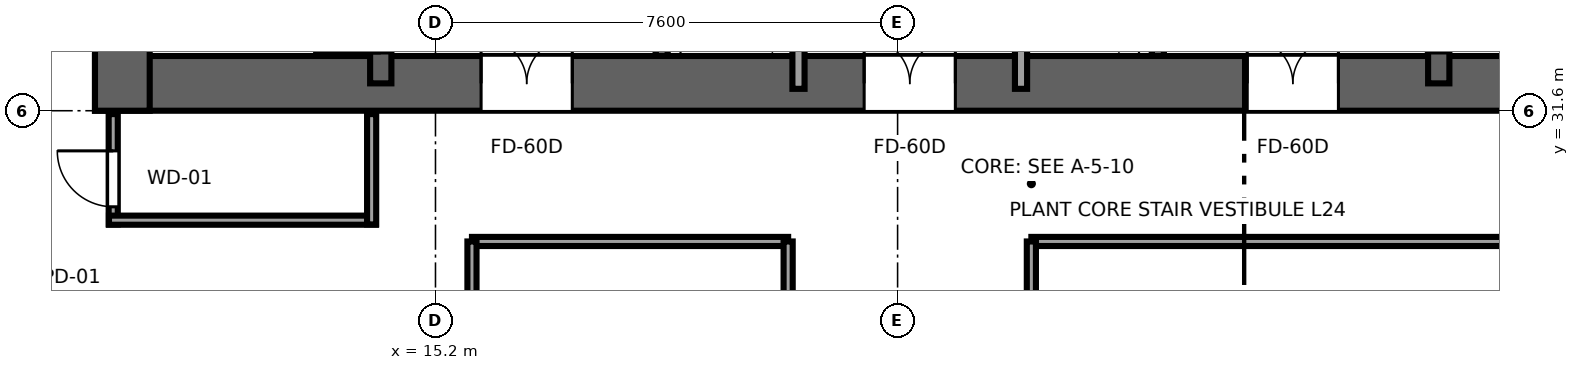
"""IFC4 building model, lengths in metres.
Left out: names, types, materials, properties, quantities, classifications, styles, units other than length and angle.
Written with IfcOpenShell. Run it as: python <this file> out.ifc"""

import sys

from ifc_helpers import new_model, si_unit, direction, frame, frame_2d, origin, place, context, subcontext, project, spatial, rectangle, extrude, source, transform, mapped, element, fill, save


model = new_model("IFC4")
c1 = context("Model", 3, precision=1e-05, world=origin(), true_north=direction((0.0, 1.0)))
c2 = subcontext(c1, "Body", "Model", "MODEL_VIEW")
j1 = project(units=[si_unit("LENGTHUNIT", "METRE"), si_unit("PLANEANGLEUNIT", "RADIAN")], contexts=[c1])
p1 = place(None, origin())
s1 = spatial("IfcSite", under=j1, at=p1, CompositionType="ELEMENT")
p2 = place(p1, origin())
s2 = spatial("IfcBuilding", under=s1, at=p2, CompositionType="ELEMENT")
p3 = place(p2, frame((0.0, 0.0, 95.9)))
s3 = spatial("IfcBuildingStorey", under=s2, at=p3, CompositionType="ELEMENT", Elevation=95.9)
p4 = place(p3, frame((9.6, 32.05, 0.0), z_axis=(0.0, 0.0, 1.0), x_axis=(1.0, 0.0, 0.0)))
e1 = element("IfcWall", 1, at=p4, inside=s3, PredefinedType="SHEAR", context=c2, shape_type="SweptSolid", body=[
    extrude(rectangle(XDim=26.8, YDim=0.9, at=frame_2d((13.4, 0.0))), origin(), (0.0, 0.0, 1.0), 5.0),
])
p5 = place(p4, frame((7.85, 0.0, 0.0), z_axis=(0.0, 0.0, 1.0), x_axis=(-1.0, 0.0, 0.0)))
e2 = element("IfcOpeningElement", 2, at=p5, cuts=e1, PredefinedType="OPENING", context=c2, shape_type="SweptSolid", body=[
    extrude(rectangle(XDim=1.5, YDim=2.04, at=frame_2d((0.75, 1.02))), frame((0.0, 0.46, 0.0), z_axis=(0.0, -1.0, 0.0), x_axis=(1.0, 0.0, 0.0)), (0.0, 0.0, 1.0), 0.92),
])
p6 = place(p4, frame((14.15, 0.0, 0.0), z_axis=(0.0, 0.0, 1.0), x_axis=(-1.0, 0.0, 0.0)))
e3 = element("IfcOpeningElement", 3, at=p6, cuts=e1, PredefinedType="OPENING", context=c2, shape_type="SweptSolid", body=[
    extrude(rectangle(XDim=1.5, YDim=2.04, at=frame_2d((0.75, 1.02))), frame((0.0, 0.46, 0.0), z_axis=(0.0, -1.0, 0.0), x_axis=(1.0, 0.0, 0.0)), (0.0, 0.0, 1.0), 0.92),
])
p7 = place(p4, frame((20.45, 0.0, 0.0), z_axis=(0.0, 0.0, 1.0), x_axis=(-1.0, 0.0, 0.0)))
e4 = element("IfcOpeningElement", 4, at=p7, cuts=e1, PredefinedType="OPENING", context=c2, shape_type="SweptSolid", body=[
    extrude(rectangle(XDim=1.5, YDim=2.04, at=frame_2d((0.75, 1.02))), frame((0.0, 0.46, 0.0), z_axis=(0.0, -1.0, 0.0), x_axis=(1.0, 0.0, 0.0)), (0.0, 0.0, 1.0), 0.92),
])
p8 = place(p3, frame((10.05, 31.6, 0.0), z_axis=(0.0, 0.0, 1.0), x_axis=(0.0, 1.0, 0.0)))
e5 = element("IfcWall", 5, at=p8, inside=s3, PredefinedType="SHEAR", context=c2, shape_type="SweptSolid", body=[
    extrude(rectangle(XDim=13.6, YDim=0.9, at=frame_2d((6.8, 0.0))), origin(), (0.0, 0.0, 1.0), 5.0),
])
p9 = place(p3, frame((14.3, 32.05, 0.0), z_axis=(0.0, 0.0, 1.0), x_axis=(0.0, 1.0, 0.0)))
e6 = element("IfcWall", 6, at=p9, inside=s3, PredefinedType="SHEAR", context=c2, shape_type="SweptSolid", body=[
    extrude(rectangle(XDim=12.7, YDim=0.35, at=frame_2d((6.35, 0.0))), origin(), (0.0, 0.0, 1.0), 5.0),
])
p10 = place(p9, frame((0.5, 0.0, 0.0)))
e7 = element("IfcOpeningElement", 7, at=p10, cuts=e6, PredefinedType="OPENING", context=c2, shape_type="SweptSolid", body=[
    extrude(rectangle(XDim=1.1, YDim=2.12, at=frame_2d((0.55, 1.06))), frame((0.0, 0.185, 0.0), z_axis=(0.0, -1.0, 0.0), x_axis=(1.0, 0.0, 0.0)), (0.0, 0.0, 1.0), 0.37),
])
p11 = place(p3, frame((31.7, 32.05, 0.0), z_axis=(0.0, 0.0, 1.0), x_axis=(0.0, 1.0, 0.0)))
e8 = element("IfcWall", 8, at=p11, inside=s3, PredefinedType="SHEAR", context=c2, shape_type="SweptSolid", body=[
    extrude(rectangle(XDim=12.7, YDim=0.35, at=frame_2d((6.35, 0.0))), origin(), (0.0, 0.0, 1.0), 5.0),
])
p12 = place(p11, frame((1.6, 0.0, 0.0), z_axis=(0.0, 0.0, 1.0), x_axis=(-1.0, 0.0, 0.0)))
e9 = element("IfcOpeningElement", 9, at=p12, cuts=e8, PredefinedType="OPENING", context=c2, shape_type="SweptSolid", body=[
    extrude(rectangle(XDim=1.1, YDim=2.12, at=frame_2d((0.55, 1.06))), frame((0.0, 0.185, 0.0), z_axis=(0.0, -1.0, 0.0), x_axis=(1.0, 0.0, 0.0)), (0.0, 0.0, 1.0), 0.37),
])
for number, where, z_axis, x_axis in (
    (10, (18.92, 32.504, 0.0), (0.0, 0.0, 1.0), (0.0, 1.0, 0.0)),
    (11, (27.08, 32.504, 0.0), (0.0, 0.0, 1.0), (0.0, 1.0, 0.0)),
):
    element("IfcWall", number, at=place(p3, frame(where, z_axis=z_axis, x_axis=x_axis)), inside=s3, PredefinedType="SOLIDWALL", context=c2, shape_type="SweptSolid", body=[
        extrude(rectangle(XDim=3.646, YDim=0.2, at=frame_2d((1.823, 0.0))), origin(), (0.0, 0.0, 1.0), 4.82),
    ])
for number, where, z_axis, x_axis in (
    (12, (21.17, 31.96, 0.0), (0.0, 0.0, 1.0), (0.0, 1.0, 0.0)),
    (13, (24.83, 31.96, 0.0), (0.0, 0.0, 1.0), (0.0, 1.0, 0.0)),
):
    element("IfcWall", number, at=place(p3, frame(where, z_axis=z_axis, x_axis=x_axis)), inside=s3, PredefinedType="SOLIDWALL", context=c2, shape_type="SweptSolid", body=[
        extrude(rectangle(XDim=12.58, YDim=0.2, at=frame_2d((6.29, 0.0))), origin(), (0.0, 0.0, 1.0), 4.82),
    ])
p13 = place(p3, frame((15.8, 29.45, 0.0), z_axis=(0.0, 0.0, 1.0), x_axis=(1.0, 0.0, 0.0)))
e14 = element("IfcWall", 14, at=p13, inside=s3, PredefinedType="PARTITIONING", context=c2, shape_type="SweptSolid", body=[
    extrude(rectangle(XDim=5.2, YDim=0.15, at=frame_2d((2.6, 0.0))), origin(), (0.0, 0.0, 1.0), 4.82),
])
for number, where, z_axis, x_axis in (
    (15, (15.8, 24.05, 0.0), (0.0, 0.0, 1.0), (0.0, 1.0, 0.0)),
    (16, (21.0, 24.05, 0.0), (0.0, 0.0, 1.0), (0.0, 1.0, 0.0)),
):
    element("IfcWall", number, at=place(p3, frame(where, z_axis=z_axis, x_axis=x_axis)), inside=s3, PredefinedType="PARTITIONING", context=c2, shape_type="SweptSolid", body=[
        extrude(rectangle(XDim=5.4, YDim=0.15, at=frame_2d((2.7, 0.0))), origin(), (0.0, 0.0, 1.0), 4.82),
    ])
p14 = place(p3, frame((25.0, 29.45, 0.0), z_axis=(0.0, 0.0, 1.0), x_axis=(1.0, 0.0, 0.0)))
e17 = element("IfcWall", 17, at=p14, inside=s3, PredefinedType="PARTITIONING", context=c2, shape_type="SweptSolid", body=[
    extrude(rectangle(XDim=9.35, YDim=0.15, at=frame_2d((4.675, 0.0))), origin(), (0.0, 0.0, 1.0), 4.82),
])
p15 = place(p3, frame((25.0, 24.05, 0.0), z_axis=(0.0, 0.0, 1.0), x_axis=(0.0, 1.0, 0.0)))
e18 = element("IfcWall", 18, at=p15, inside=s3, PredefinedType="PARTITIONING", context=c2, shape_type="SweptSolid", body=[
    extrude(rectangle(XDim=5.4, YDim=0.15, at=frame_2d((2.7, 0.0))), origin(), (0.0, 0.0, 1.0), 4.82),
])
p16 = place(p3, frame((9.9, 29.73, 0.0), z_axis=(0.0, 0.0, 1.0), x_axis=(0.0, 1.0, 0.0)))
e19 = element("IfcWall", 19, at=p16, inside=s3, PredefinedType="PARTITIONING", context=c2, shape_type="SweptSolid", body=[
    extrude(rectangle(XDim=1.815, YDim=0.15, at=frame_2d((0.907, 0.0))), origin(), (0.0, 0.0, 1.0), 4.82),
])
p17 = place(p16, frame((0.29, 0.0, 0.0)))
e20 = element("IfcOpeningElement", 20, at=p17, cuts=e19, PredefinedType="OPENING", context=c2, shape_type="SweptSolid", body=[
    extrude(rectangle(XDim=0.92, YDim=2.01, at=frame_2d((0.46, 1.005))), frame((0.0, 0.085, 0.0), z_axis=(0.0, -1.0, 0.0), x_axis=(1.0, 0.0, 0.0)), (0.0, 0.0, 1.0), 0.17),
])
p18 = place(p3, frame((9.83, 29.8, 0.0), z_axis=(0.0, 0.0, 1.0), x_axis=(1.0, 0.0, 0.0)))
e21 = element("IfcWall", 21, at=p18, inside=s3, PredefinedType="PARTITIONING", context=c2, shape_type="SweptSolid", body=[
    extrude(rectangle(XDim=4.39, YDim=0.15, at=frame_2d((2.195, 0.0))), origin(), (0.0, 0.0, 1.0), 4.82),
])
p19 = place(p3, frame((14.15, 29.73, 0.0), z_axis=(0.0, 0.0, 1.0), x_axis=(0.0, 1.0, 0.0)))
e22 = element("IfcWall", 22, at=p19, inside=s3, PredefinedType="PARTITIONING", context=c2, shape_type="SweptSolid", body=[
    extrude(rectangle(XDim=1.815, YDim=0.15, at=frame_2d((0.907, 0.0))), origin(), (0.0, 0.0, 1.0), 4.82),
])
m1 = source(origin(), c2, "Body", "SweptSolid", [
    extrude(rectangle(XDim=1.1, YDim=2.12, at=frame_2d((0.55, 1.06))), frame((0.0, 0.025, 0.0), z_axis=(0.0, -1.0, 0.0), x_axis=(1.0, 0.0, 0.0)), (0.0, 0.0, 1.0), 0.05),
])
p20 = place(p10, origin())
e23 = element("IfcDoor", 23, at=p20, inside=s3, OperationType="SINGLE_SWING_LEFT", PredefinedType="DOOR", context=c2, shape_type="MappedRepresentation", body=[
    mapped(m1, transform((0.0, 0.0, 0.0), x_axis=(1.0, 0.0, 0.0), y_axis=(0.0, 1.0, 0.0), z_axis=(0.0, 0.0, 1.0), scale=1.0)),
])
fill(e7, e23)
p21 = place(p12, origin())
e24 = element("IfcDoor", 24, at=p21, inside=s3, OperationType="SINGLE_SWING_RIGHT", PredefinedType="DOOR", context=c2, shape_type="MappedRepresentation", body=[
    mapped(m1, transform((0.0, 0.0, 0.0), x_axis=(1.0, 0.0, 0.0), y_axis=(0.0, 1.0, 0.0), z_axis=(0.0, 0.0, 1.0), scale=1.0)),
])
fill(e9, e24)
m2 = source(origin(), c2, "Body", "SweptSolid", [
    extrude(rectangle(XDim=1.5, YDim=2.04, at=frame_2d((0.75, 1.02))), frame((0.0, 0.025, 0.0), z_axis=(0.0, -1.0, 0.0), x_axis=(1.0, 0.0, 0.0)), (0.0, 0.0, 1.0), 0.05),
])
p22 = place(p5, origin())
e25 = element("IfcDoor", 25, at=p22, inside=s3, OperationType="DOUBLE_DOOR_SINGLE_SWING", PredefinedType="DOOR", context=c2, shape_type="MappedRepresentation", body=[
    mapped(m2, transform((0.0, 0.0, 0.0), x_axis=(1.0, 0.0, 0.0), y_axis=(0.0, 1.0, 0.0), z_axis=(0.0, 0.0, 1.0), scale=1.0)),
])
fill(e2, e25)
p23 = place(p6, origin())
e26 = element("IfcDoor", 26, at=p23, inside=s3, OperationType="DOUBLE_DOOR_SINGLE_SWING", PredefinedType="DOOR", context=c2, shape_type="MappedRepresentation", body=[
    mapped(m2, transform((0.0, 0.0, 0.0), x_axis=(1.0, 0.0, 0.0), y_axis=(0.0, 1.0, 0.0), z_axis=(0.0, 0.0, 1.0), scale=1.0)),
])
fill(e3, e26)
p24 = place(p7, origin())
e27 = element("IfcDoor", 27, at=p24, inside=s3, OperationType="DOUBLE_DOOR_SINGLE_SWING", PredefinedType="DOOR", context=c2, shape_type="MappedRepresentation", body=[
    mapped(m2, transform((0.0, 0.0, 0.0), x_axis=(1.0, 0.0, 0.0), y_axis=(0.0, 1.0, 0.0), z_axis=(0.0, 0.0, 1.0), scale=1.0)),
])
fill(e4, e27)
m3 = source(origin(), c2, "Body", "SweptSolid", [
    extrude(rectangle(XDim=0.92, YDim=2.01, at=frame_2d((0.46, 1.005))), frame((0.0, 0.025, 0.0), z_axis=(0.0, -1.0, 0.0), x_axis=(1.0, 0.0, 0.0)), (0.0, 0.0, 1.0), 0.05),
])
p25 = place(p17, origin())
e28 = element("IfcDoor", 28, at=p25, inside=s3, OperationType="SINGLE_SWING_RIGHT", PredefinedType="DOOR", context=c2, shape_type="MappedRepresentation", body=[
    mapped(m3, transform((0.0, 0.0, 0.0), x_axis=(1.0, 0.0, 0.0), y_axis=(0.0, 1.0, 0.0), z_axis=(0.0, 0.0, 1.0), scale=1.0)),
])
fill(e20, e28)
save(model, sys.argv[1])
